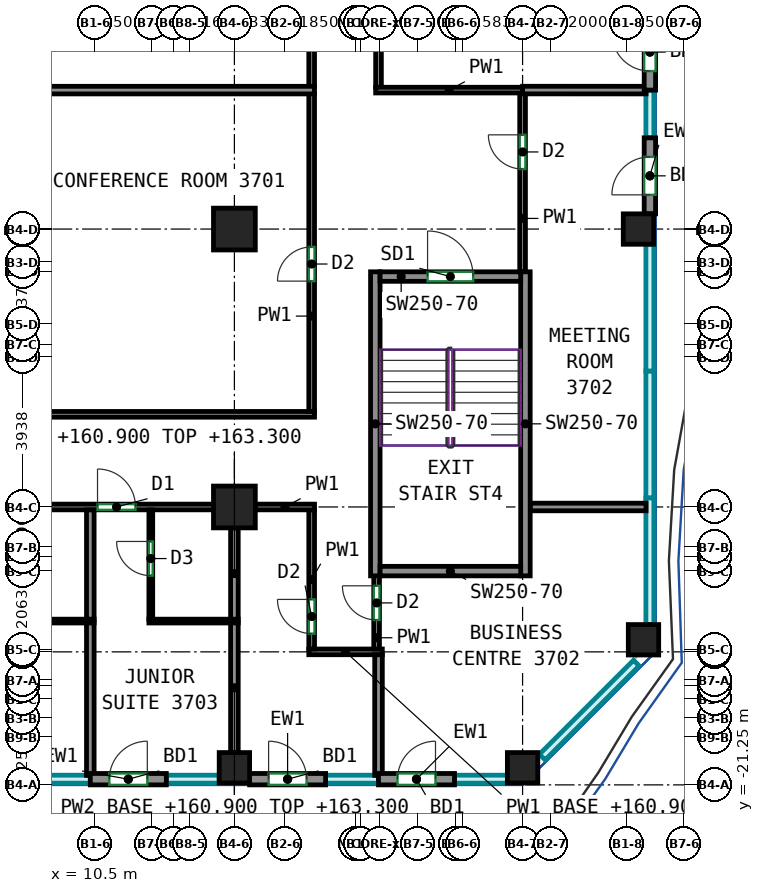
"""IFC4 building model, lengths in metres.
Left out: names, types, materials, properties, quantities, classifications, styles, units other than length and angle.
Written with IfcOpenShell. Run it as: python <this file> out.ifc"""

import sys

from ifc_helpers import new_model, si_unit, direction, frame, frame_2d, origin, origin_2d, place, context, subcontext, project, spatial, rectangle, extrude, source, transform, mapped, element, fill, save


model = new_model("IFC4")
c1 = context("Model", 3, precision=1e-05, world=origin(), true_north=direction((0.0, 1.0)))
c2 = subcontext(c1, "Body", "Model", "MODEL_VIEW")
j1 = project(units=[si_unit("LENGTHUNIT", "METRE"), si_unit("PLANEANGLEUNIT", "RADIAN")], contexts=[c1])
p1 = place(None, origin())
s1 = spatial("IfcSite", under=j1, at=p1, CompositionType="ELEMENT")
p2 = place(p1, origin())
s2 = spatial("IfcBuilding", under=s1, at=p2, CompositionType="ELEMENT")
p3 = place(p2, frame((0.0, 0.0, 160.9)))
s3 = spatial("IfcBuildingStorey", under=s2, at=p3, CompositionType="ELEMENT", Elevation=160.9)
m1 = source(origin(), c2, "Body", "SweptSolid", [
    extrude(rectangle(XDim=0.8, YDim=0.8, at=origin_2d()), origin(), (0.0, 0.0, 1.0), 3.0),
])
p4 = place(p3, frame((14.167, -20.8, 0.0), z_axis=(0.0, 0.0, 1.0), x_axis=(1.0, 0.0, 0.0)))
e1 = element("IfcColumn", 1, at=p4, inside=s3, PredefinedType="COLUMN", context=c2, shape_type="MappedRepresentation", body=[
    mapped(m1, transform((0.0, 0.0, 0.0))),
])
m2 = source(origin(), c2, "Body", "SweptSolid", [
    extrude(rectangle(XDim=1.1, YDim=1.1, at=origin_2d()), origin(), (0.0, 0.0, 1.0), 3.0),
])
for number, where, z_axis, x_axis in (
    (2, (14.167, -13.938, 0.0), (0.0, 0.0, 1.0), (1.0, 0.0, 0.0)),
    (3, (14.167, -6.625, 0.0), (0.0, 0.0, 1.0), (1.0, 0.0, 0.0)),
):
    element("IfcColumn", number, at=place(p3, frame(where, z_axis=z_axis, x_axis=x_axis)), inside=s3, PredefinedType="COLUMN", context=c2, shape_type="MappedRepresentation", body=[
        mapped(m2, transform((0.0, 0.0, 0.0))),
    ])
for number, where, z_axis, x_axis in (
    (4, (21.75, -20.8, 0.0), (0.0, 0.0, 1.0), (1.0, 0.0, 0.0)),
    (5, (24.8, -6.625, 0.0), (0.0, 0.0, 1.0), (1.0, 0.0, 0.0)),
    (6, (24.932, -17.432, 0.0), (0.0, 0.0, 1.0), (1.0, 0.0, 0.0)),
):
    element("IfcColumn", number, at=place(p3, frame(where, z_axis=z_axis, x_axis=x_axis)), inside=s3, PredefinedType="COLUMN", context=c2, shape_type="MappedRepresentation", body=[
        mapped(m1, transform((0.0, 0.0, 0.0))),
    ])
m3 = source(origin(), c2, "Body", "SweptSolid", [
    extrude(rectangle(XDim=8.0, YDim=0.25, at=frame_2d((4.0, 0.0))), origin(), (0.0, 0.0, 1.0), 3.0),
])
for number, where, z_axis, x_axis in (
    (7, (17.875, -15.75, 0.0), (0.0, 0.0, 1.0), (0.0, 1.0, 0.0)),
    (8, (21.825, -15.75, 0.0), (0.0, 0.0, 1.0), (0.0, 1.0, 0.0)),
):
    element("IfcWall", number, at=place(p3, frame(where, z_axis=z_axis, x_axis=x_axis)), inside=s3, PredefinedType="SHEAR", context=c2, shape_type="MappedRepresentation", body=[
        mapped(m3, transform((0.0, 0.0, 0.0))),
    ])
m4 = source(origin(), c2, "Body", "SweptSolid", [
    extrude(rectangle(XDim=3.7, YDim=0.25, at=frame_2d((1.85, 0.0))), origin(), (0.0, 0.0, 1.0), 3.0),
])
p5 = place(p3, frame((18.0, -15.625, 0.0), z_axis=(0.0, 0.0, 1.0), x_axis=(1.0, 0.0, 0.0)))
e9 = element("IfcWall", 9, at=p5, inside=s3, PredefinedType="SHEAR", context=c2, shape_type="MappedRepresentation", body=[
    mapped(m4, transform((0.0, 0.0, 0.0))),
])
p6 = place(p3, frame((18.0, -7.875, 0.0), z_axis=(0.0, 0.0, 1.0), x_axis=(1.0, 0.0, 0.0)))
e10 = element("IfcWall", 10, at=p6, inside=s3, PredefinedType="SHEAR", context=c2, shape_type="MappedRepresentation", body=[
    mapped(m4, transform((0.0, 0.0, 0.0))),
])
p7 = place(p6, frame((1.25, 0.0, 0.0)))
e11 = element("IfcOpeningElement", 11, at=p7, cuts=e10, PredefinedType="OPENING", context=c2, shape_type="SweptSolid", body=[
    extrude(rectangle(XDim=1.2, YDim=2.1, at=frame_2d((0.6, 1.05))), frame((0.0, 0.135, 0.0), z_axis=(0.0, -1.0, 0.0), x_axis=(1.0, 0.0, 0.0)), (0.0, 0.0, 1.0), 0.27),
])
m5 = source(origin(), c2, "Body", "SweptSolid", [
    extrude(rectangle(XDim=2.0, YDim=0.3, at=frame_2d((1.0, 0.0))), origin(), (0.0, 0.0, 1.0), 3.0),
])
p8 = place(p3, frame((10.375, -21.1, 0.0), z_axis=(0.0, 0.0, 1.0), x_axis=(1.0, 0.0, 0.0)))
e12 = element("IfcWall", 12, at=p8, inside=s3, PredefinedType="SOLIDWALL", context=c2, shape_type="MappedRepresentation", body=[
    mapped(m5, transform((0.0, 0.0, 0.0))),
])
p9 = place(p8, frame((0.5, 0.0, 0.0)))
e13 = element("IfcOpeningElement", 13, at=p9, cuts=e12, PredefinedType="OPENING", context=c2, shape_type="SweptSolid", body=[
    extrude(rectangle(XDim=1.0, YDim=2.1, at=frame_2d((0.5, 1.05))), frame((0.0, 0.16, 0.0), z_axis=(0.0, -1.0, 0.0), x_axis=(1.0, 0.0, 0.0)), (0.0, 0.0, 1.0), 0.32),
])
p10 = place(p3, frame((14.567, -21.1, 0.0), z_axis=(0.0, 0.0, 1.0), x_axis=(1.0, 0.0, 0.0)))
e14 = element("IfcWall", 14, at=p10, inside=s3, PredefinedType="SOLIDWALL", context=c2, shape_type="MappedRepresentation", body=[
    mapped(m5, transform((0.0, 0.0, 0.0))),
])
p11 = place(p10, frame((0.5, 0.0, 0.0)))
e15 = element("IfcOpeningElement", 15, at=p11, cuts=e14, PredefinedType="OPENING", context=c2, shape_type="SweptSolid", body=[
    extrude(rectangle(XDim=1.0, YDim=2.1, at=frame_2d((0.5, 1.05))), frame((0.0, 0.16, 0.0), z_axis=(0.0, -1.0, 0.0), x_axis=(1.0, 0.0, 0.0)), (0.0, 0.0, 1.0), 0.32),
])
p12 = place(p3, frame((17.958, -21.1, 0.0), z_axis=(0.0, 0.0, 1.0), x_axis=(1.0, 0.0, 0.0)))
e16 = element("IfcWall", 16, at=p12, inside=s3, PredefinedType="SOLIDWALL", context=c2, shape_type="MappedRepresentation", body=[
    mapped(m5, transform((0.0, 0.0, 0.0))),
])
p13 = place(p12, frame((0.5, 0.0, 0.0)))
e17 = element("IfcOpeningElement", 17, at=p13, cuts=e16, PredefinedType="OPENING", context=c2, shape_type="SweptSolid", body=[
    extrude(rectangle(XDim=1.0, YDim=2.1, at=frame_2d((0.5, 1.05))), frame((0.0, 0.16, 0.0), z_axis=(0.0, -1.0, 0.0), x_axis=(1.0, 0.0, 0.0)), (0.0, 0.0, 1.0), 0.32),
])
p14 = place(p3, frame((25.1, -6.225, 0.0), z_axis=(0.0, 0.0, 1.0), x_axis=(0.0, 1.0, 0.0)))
e18 = element("IfcWall", 18, at=p14, inside=s3, PredefinedType="SOLIDWALL", context=c2, shape_type="MappedRepresentation", body=[
    mapped(m5, transform((0.0, 0.0, 0.0))),
])
p15 = place(p14, frame((0.5, 0.0, 0.0)))
e19 = element("IfcOpeningElement", 19, at=p15, cuts=e18, PredefinedType="OPENING", context=c2, shape_type="SweptSolid", body=[
    extrude(rectangle(XDim=1.0, YDim=2.1, at=frame_2d((0.5, 1.05))), frame((0.0, 0.16, 0.0), z_axis=(0.0, -1.0, 0.0), x_axis=(1.0, 0.0, 0.0)), (0.0, 0.0, 1.0), 0.32),
])
p16 = place(p3, frame((25.1, -2.969, 0.0), z_axis=(0.0, 0.0, 1.0), x_axis=(0.0, 1.0, 0.0)))
e20 = element("IfcWall", 20, at=p16, inside=s3, PredefinedType="SOLIDWALL", context=c2, shape_type="MappedRepresentation", body=[
    mapped(m5, transform((0.0, 0.0, 0.0))),
])
p17 = place(p16, frame((0.5, 0.0, 0.0)))
e21 = element("IfcOpeningElement", 21, at=p17, cuts=e20, PredefinedType="OPENING", context=c2, shape_type="SweptSolid", body=[
    extrude(rectangle(XDim=1.0, YDim=2.1, at=frame_2d((0.5, 1.05))), frame((0.0, 0.16, 0.0), z_axis=(0.0, -1.0, 0.0), x_axis=(1.0, 0.0, 0.0)), (0.0, 0.0, 1.0), 0.32),
])
p18 = place(p3, frame((7.133, -13.938, 0.0), z_axis=(0.0, 0.0, 1.0), x_axis=(1.0, 0.0, 0.0)))
e22 = element("IfcWall", 22, at=p18, inside=s3, PredefinedType="PARTITIONING", context=c2, shape_type="SweptSolid", body=[
    extrude(rectangle(XDim=6.484, YDim=0.15, at=frame_2d((3.242, 0.0))), origin(), (0.0, 0.0, 1.0), 2.4),
])
p19 = place(p18, frame((3.432, 0.0, 0.0)))
e23 = element("IfcOpeningElement", 23, at=p19, cuts=e22, PredefinedType="OPENING", context=c2, shape_type="SweptSolid", body=[
    extrude(rectangle(XDim=1.0, YDim=2.1, at=frame_2d((0.5, 1.05))), frame((0.0, 0.085, 0.0), z_axis=(0.0, -1.0, 0.0), x_axis=(1.0, 0.0, 0.0)), (0.0, 0.0, 1.0), 0.17),
])
p20 = place(p3, frame((16.125, -17.75, 0.0), z_axis=(0.0, 0.0, 1.0), x_axis=(1.0, 0.0, 0.0)))
e24 = element("IfcWall", 24, at=p20, inside=s3, PredefinedType="PARTITIONING", context=c2, shape_type="SweptSolid", body=[
    extrude(rectangle(XDim=1.934, YDim=0.15, at=frame_2d((0.967, 0.0))), origin(), (0.0, 0.0, 1.0), 2.4),
])
p21 = place(p3, frame((16.2, -17.675, 0.0), z_axis=(0.0, 0.0, 1.0), x_axis=(0.0, 1.0, 0.0)))
e25 = element("IfcWall", 25, at=p21, inside=s3, PredefinedType="PARTITIONING", context=c2, shape_type="SweptSolid", body=[
    extrude(rectangle(XDim=3.662, YDim=0.15, at=frame_2d((1.831, 0.0))), origin(), (0.0, 0.0, 1.0), 3.0),
])
p22 = place(p21, frame((0.405, 0.0, 0.0)))
e26 = element("IfcOpeningElement", 26, at=p22, cuts=e25, PredefinedType="OPENING", context=c2, shape_type="SweptSolid", body=[
    extrude(rectangle(XDim=0.9, YDim=2.1, at=frame_2d((0.45, 1.05))), frame((0.0, 0.085, 0.0), z_axis=(0.0, -1.0, 0.0), x_axis=(1.0, 0.0, 0.0)), (0.0, 0.0, 1.0), 0.17),
])
p23 = place(p3, frame((14.717, -13.938, 0.0), z_axis=(0.0, 0.0, 1.0), x_axis=(1.0, 0.0, 0.0)))
e27 = element("IfcWall", 27, at=p23, inside=s3, PredefinedType="PARTITIONING", context=c2, shape_type="SweptSolid", body=[
    extrude(rectangle(XDim=1.558, YDim=0.15, at=frame_2d((0.779, 0.0))), origin(), (0.0, 0.0, 1.0), 3.0),
])
p24 = place(p3, frame((17.909, -17.675, 0.0), z_axis=(0.0, 0.0, 1.0), x_axis=(0.0, 1.0, 0.0)))
e28 = element("IfcWall", 28, at=p24, inside=s3, PredefinedType="PARTITIONING", context=c2, shape_type="SweptSolid", body=[
    extrude(rectangle(XDim=1.975, YDim=0.15, at=frame_2d((0.988, 0.0))), origin(), (0.0, 0.0, 1.0), 3.0),
])
p25 = place(p24, frame((0.763, 0.0, 0.0)))
e29 = element("IfcOpeningElement", 29, at=p25, cuts=e28, PredefinedType="OPENING", context=c2, shape_type="SweptSolid", body=[
    extrude(rectangle(XDim=0.9, YDim=2.1, at=frame_2d((0.45, 1.05))), frame((0.0, 0.085, 0.0), z_axis=(0.0, -1.0, 0.0), x_axis=(1.0, 0.0, 0.0)), (0.0, 0.0, 1.0), 0.17),
])
p26 = place(p3, frame((17.959, -2.894, 0.0), z_axis=(0.0, 0.0, 1.0), x_axis=(0.0, 1.0, 0.0)))
e30 = element("IfcWall", 30, at=p26, inside=s3, PredefinedType="PARTITIONING", context=c2, shape_type="SweptSolid", body=[
    extrude(rectangle(XDim=6.019, YDim=0.15, at=frame_2d((3.01, 0.0))), origin(), (0.0, 0.0, 1.0), 3.0),
])
p27 = place(p26, frame((4.216, 0.0, 0.0)))
e31 = element("IfcOpeningElement", 31, at=p27, cuts=e30, PredefinedType="OPENING", context=c2, shape_type="SweptSolid", body=[
    extrude(rectangle(XDim=0.9, YDim=2.1, at=frame_2d((0.45, 1.05))), frame((0.0, 0.085, 0.0), z_axis=(0.0, -1.0, 0.0), x_axis=(1.0, 0.0, 0.0)), (0.0, 0.0, 1.0), 0.17),
])
p28 = place(p3, frame((21.751, -2.969, 0.0), z_axis=(0.0, 0.0, 1.0), x_axis=(-1.0, 0.0, 0.0)))
e32 = element("IfcWall", 32, at=p28, inside=s3, PredefinedType="PARTITIONING", context=c2, shape_type="SweptSolid", body=[
    extrude(rectangle(XDim=3.867, YDim=0.15, at=frame_2d((1.934, 0.0))), origin(), (0.0, 0.0, 1.0), 3.0),
])
p29 = place(p3, frame((21.75, -7.75, 0.0), z_axis=(0.0, 0.0, 1.0), x_axis=(0.0, 1.0, 0.0)))
e33 = element("IfcWall", 33, at=p29, inside=s3, PredefinedType="PARTITIONING", context=c2, shape_type="SweptSolid", body=[
    extrude(rectangle(XDim=4.682, YDim=0.15, at=frame_2d((2.341, 0.0))), origin(), (0.0, 0.0, 1.0), 3.0),
])
p30 = place(p29, frame((2.704, 0.0, 0.0)))
e34 = element("IfcOpeningElement", 34, at=p30, cuts=e33, PredefinedType="OPENING", context=c2, shape_type="SweptSolid", body=[
    extrude(rectangle(XDim=0.9, YDim=2.1, at=frame_2d((0.45, 1.05))), frame((0.0, 0.085, 0.0), z_axis=(0.0, -1.0, 0.0), x_axis=(1.0, 0.0, 0.0)), (0.0, 0.0, 1.0), 0.17),
])
p31 = place(p3, frame((-12.075, -11.5, 0.0), z_axis=(0.0, 0.0, 1.0), x_axis=(1.0, 0.0, 0.0)))
e35 = element("IfcWall", 35, at=p31, inside=s3, PredefinedType="PARTITIONING", context=c2, shape_type="SweptSolid", body=[
    extrude(rectangle(XDim=28.35, YDim=0.15, at=frame_2d((14.175, 0.0))), origin(), (0.0, 0.0, 1.0), 3.0),
])
p32 = place(p31, frame((11.373, 0.0, 0.0)))
e36 = element("IfcOpeningElement", 36, at=p32, cuts=e35, PredefinedType="OPENING", context=c2, shape_type="SweptSolid", body=[
    extrude(rectangle(XDim=0.9, YDim=2.1, at=frame_2d((0.45, 1.05))), frame((0.0, 0.085, 0.0), z_axis=(0.0, -1.0, 0.0), x_axis=(1.0, 0.0, 0.0)), (0.0, 0.0, 1.0), 0.17),
])
p33 = place(p3, frame((16.2, -11.425, 0.0), z_axis=(0.0, 0.0, 1.0), x_axis=(0.0, 1.0, 0.0)))
e37 = element("IfcWall", 37, at=p33, inside=s3, PredefinedType="PARTITIONING", context=c2, shape_type="SweptSolid", body=[
    extrude(rectangle(XDim=8.366, YDim=0.15, at=frame_2d((4.183, 0.0))), origin(), (0.0, 0.0, 1.0), 3.0),
])
p34 = place(p33, frame((3.43, 0.0, 0.0)))
e38 = element("IfcOpeningElement", 38, at=p34, cuts=e37, PredefinedType="OPENING", context=c2, shape_type="SweptSolid", body=[
    extrude(rectangle(XDim=0.9, YDim=2.1, at=frame_2d((0.45, 1.05))), frame((0.0, 0.085, 0.0), z_axis=(0.0, -1.0, 0.0), x_axis=(1.0, 0.0, 0.0)), (0.0, 0.0, 1.0), 0.17),
])
p35 = place(p3, frame((16.2, -2.879, 0.0), z_axis=(0.0, 0.0, 1.0), x_axis=(0.0, 1.0, 0.0)))
e39 = element("IfcWall", 39, at=p35, inside=s3, PredefinedType="PARTITIONING", context=c2, shape_type="SweptSolid", body=[
    extrude(rectangle(XDim=3.477, YDim=0.15, at=frame_2d((1.738, 0.0))), origin(), (0.0, 0.0, 1.0), 3.0),
])
p36 = place(p35, frame((2.273, 0.0, 0.0)))
e40 = element("IfcOpeningElement", 40, at=p36, cuts=e39, PredefinedType="OPENING", context=c2, shape_type="SweptSolid", body=[
    extrude(rectangle(XDim=0.9, YDim=2.1, at=frame_2d((0.45, 1.05))), frame((0.0, 0.085, 0.0), z_axis=(0.0, -1.0, 0.0), x_axis=(1.0, 0.0, 0.0)), (0.0, 0.0, 1.0), 0.17),
])
p37 = place(p3, frame((8.125, -16.94, 0.0), z_axis=(0.0, 0.0, 1.0), x_axis=(1.0, 0.0, 0.0)))
e41 = element("IfcWall", 41, at=p37, inside=s3, PredefinedType="PARTITIONING", context=c2, shape_type="SweptSolid", body=[
    extrude(rectangle(XDim=2.35, YDim=0.1, at=frame_2d((1.175, 0.0))), origin(), (0.0, 0.0, 1.0), 3.0),
])
p38 = place(p3, frame((10.375, -21.0, 0.0), z_axis=(0.0, 0.0, 1.0), x_axis=(0.0, 1.0, 0.0)))
e42 = element("IfcWall", 42, at=p38, inside=s3, PredefinedType="PARTITIONING", context=c2, shape_type="SweptSolid", body=[
    extrude(rectangle(XDim=4.01, YDim=0.2, at=frame_2d((2.005, 0.0))), origin(), (0.0, 0.0, 1.0), 3.0),
])
p39 = place(p3, frame((10.375, -16.89, 0.0), z_axis=(0.0, 0.0, 1.0), x_axis=(0.0, 1.0, 0.0)))
e43 = element("IfcWall", 43, at=p39, inside=s3, PredefinedType="PARTITIONING", context=c2, shape_type="SweptSolid", body=[
    extrude(rectangle(XDim=2.875, YDim=0.2, at=frame_2d((1.438, 0.0))), origin(), (0.0, 0.0, 1.0), 3.0),
])
p40 = place(p3, frame((11.967, -16.89, 0.0), z_axis=(0.0, 0.0, 1.0), x_axis=(0.0, 1.0, 0.0)))
e44 = element("IfcWall", 44, at=p40, inside=s3, PredefinedType="PARTITIONING", context=c2, shape_type="SweptSolid", body=[
    extrude(rectangle(XDim=2.875, YDim=0.1, at=frame_2d((1.438, 0.0))), origin(), (0.0, 0.0, 1.0), 3.0),
])
p41 = place(p40, frame((1.145, 0.0, 0.0)))
e45 = element("IfcOpeningElement", 45, at=p41, cuts=e44, PredefinedType="OPENING", context=c2, shape_type="SweptSolid", body=[
    extrude(rectangle(XDim=0.9, YDim=2.1, at=frame_2d((0.45, 1.05))), frame((0.0, 0.06, 0.0), z_axis=(0.0, -1.0, 0.0), x_axis=(1.0, 0.0, 0.0)), (0.0, 0.0, 1.0), 0.12),
])
p42 = place(p3, frame((11.917, -16.94, 0.0), z_axis=(0.0, 0.0, 1.0), x_axis=(1.0, 0.0, 0.0)))
e46 = element("IfcWall", 46, at=p42, inside=s3, PredefinedType="PARTITIONING", context=c2, shape_type="SweptSolid", body=[
    extrude(rectangle(XDim=2.35, YDim=0.1, at=frame_2d((1.175, 0.0))), origin(), (0.0, 0.0, 1.0), 3.0),
])
p43 = place(p3, frame((14.167, -20.4, 0.0), z_axis=(0.0, 0.0, 1.0), x_axis=(0.0, 1.0, 0.0)))
e47 = element("IfcWall", 47, at=p43, inside=s3, PredefinedType="PARTITIONING", context=c2, shape_type="SweptSolid", body=[
    extrude(rectangle(XDim=3.41, YDim=0.2, at=frame_2d((1.705, 0.0))), origin(), (0.0, 0.0, 1.0), 2.4),
])
p44 = place(p3, frame((14.167, -16.89, 0.0), z_axis=(0.0, 0.0, 1.0), x_axis=(0.0, 1.0, 0.0)))
e48 = element("IfcWall", 48, at=p44, inside=s3, PredefinedType="PARTITIONING", context=c2, shape_type="SweptSolid", body=[
    extrude(rectangle(XDim=2.402, YDim=0.2, at=frame_2d((1.201, 0.0))), origin(), (0.0, 0.0, 1.0), 2.4),
])
p45 = place(p3, frame((17.959, -21.0, 0.0), z_axis=(0.0, 0.0, 1.0), x_axis=(0.0, 1.0, 0.0)))
e49 = element("IfcWall", 49, at=p45, inside=s3, PredefinedType="PARTITIONING", context=c2, shape_type="SweptSolid", body=[
    extrude(rectangle(XDim=3.173, YDim=0.2, at=frame_2d((1.586, 0.0))), origin(), (0.0, 0.0, 1.0), 3.0),
])
p46 = place(p3, frame((25.0, -13.938, 0.0), z_axis=(0.0, 0.0, 1.0), x_axis=(-1.0, 0.0, 0.0)))
e50 = element("IfcWall", 50, at=p46, inside=s3, PredefinedType="PARTITIONING", context=c2, shape_type="SweptSolid", body=[
    extrude(rectangle(XDim=3.05, YDim=0.2, at=frame_2d((1.525, 0.0))), origin(), (0.0, 0.0, 1.0), 3.0),
])
p47 = place(p3, frame((21.751, -2.968, 0.0), z_axis=(0.0, 0.0, 1.0), x_axis=(0.999999954829, -0.000300571071, 0.0)))
e51 = element("IfcWall", 51, at=p47, inside=s3, PredefinedType="PARTITIONING", context=c2, shape_type="SweptSolid", body=[
    extrude(rectangle(XDim=3.249, YDim=0.2, at=frame_2d((1.625, 0.0))), origin(), (0.0, 0.0, 1.0), 3.0),
])
p48 = place(p3, frame((8.4, -2.969, 0.0), z_axis=(0.0, 0.0, 1.0), x_axis=(1.0, 0.0, 0.0)))
e52 = element("IfcWall", 52, at=p48, inside=s3, PredefinedType="PARTITIONING", context=c2, shape_type="SweptSolid", body=[
    extrude(rectangle(XDim=7.873, YDim=0.2, at=frame_2d((3.937, 0.0))), origin(), (0.0, 0.0, 1.0), 3.0),
])
p49 = place(p9, origin())
e53 = element("IfcDoor", 53, at=p49, inside=s3, OperationType="SINGLE_SWING_RIGHT", PredefinedType="DOOR", context=c2, shape_type="SweptSolid", body=[
    extrude(rectangle(XDim=1.0, YDim=2.1, at=frame_2d((0.5, 1.05))), frame((0.0, 0.025, 0.0), z_axis=(0.0, -1.0, 0.0), x_axis=(1.0, 0.0, 0.0)), (0.0, 0.0, 1.0), 0.05),
])
fill(e13, e53)
p50 = place(p11, origin())
e54 = element("IfcDoor", 54, at=p50, inside=s3, OperationType="SINGLE_SWING_LEFT", PredefinedType="DOOR", context=c2, shape_type="SweptSolid", body=[
    extrude(rectangle(XDim=1.0, YDim=2.1, at=frame_2d((0.5, 1.05))), frame((0.0, 0.025, 0.0), z_axis=(0.0, -1.0, 0.0), x_axis=(1.0, 0.0, 0.0)), (0.0, 0.0, 1.0), 0.05),
])
fill(e15, e54)
p51 = place(p13, origin())
e55 = element("IfcDoor", 55, at=p51, inside=s3, OperationType="SINGLE_SWING_RIGHT", PredefinedType="DOOR", context=c2, shape_type="SweptSolid", body=[
    extrude(rectangle(XDim=1.0, YDim=2.1, at=frame_2d((0.5, 1.05))), frame((0.0, 0.025, 0.0), z_axis=(0.0, -1.0, 0.0), x_axis=(1.0, 0.0, 0.0)), (0.0, 0.0, 1.0), 0.05),
])
fill(e17, e55)
p52 = place(p15, origin())
e56 = element("IfcDoor", 56, at=p52, inside=s3, OperationType="SINGLE_SWING_LEFT", PredefinedType="DOOR", context=c2, shape_type="SweptSolid", body=[
    extrude(rectangle(XDim=1.0, YDim=2.1, at=frame_2d((0.5, 1.05))), frame((0.0, 0.025, 0.0), z_axis=(0.0, -1.0, 0.0), x_axis=(1.0, 0.0, 0.0)), (0.0, 0.0, 1.0), 0.05),
])
fill(e19, e56)
p53 = place(p17, origin())
e57 = element("IfcDoor", 57, at=p53, inside=s3, OperationType="SINGLE_SWING_RIGHT", PredefinedType="DOOR", context=c2, shape_type="SweptSolid", body=[
    extrude(rectangle(XDim=1.0, YDim=2.1, at=frame_2d((0.5, 1.05))), frame((0.0, 0.025, 0.0), z_axis=(0.0, -1.0, 0.0), x_axis=(1.0, 0.0, 0.0)), (0.0, 0.0, 1.0), 0.05),
])
fill(e21, e57)
p54 = place(p7, origin())
e58 = element("IfcDoor", 58, at=p54, inside=s3, OperationType="DOUBLE_DOOR_SINGLE_SWING", PredefinedType="DOOR", context=c2, shape_type="SweptSolid", body=[
    extrude(rectangle(XDim=1.2, YDim=2.1, at=frame_2d((0.6, 1.05))), frame((0.0, 0.025, 0.0), z_axis=(0.0, -1.0, 0.0), x_axis=(1.0, 0.0, 0.0)), (0.0, 0.0, 1.0), 0.05),
])
fill(e11, e58)
p55 = place(p22, origin())
e59 = element("IfcDoor", 59, at=p55, inside=s3, OperationType="SINGLE_SWING_RIGHT", PredefinedType="DOOR", context=c2, shape_type="SweptSolid", body=[
    extrude(rectangle(XDim=0.9, YDim=2.1, at=frame_2d((0.45, 1.05))), frame((0.0, 0.025, 0.0), z_axis=(0.0, -1.0, 0.0), x_axis=(1.0, 0.0, 0.0)), (0.0, 0.0, 1.0), 0.05),
])
fill(e26, e59)
p56 = place(p25, origin())
e60 = element("IfcDoor", 60, at=p56, inside=s3, OperationType="SINGLE_SWING_RIGHT", PredefinedType="DOOR", context=c2, shape_type="SweptSolid", body=[
    extrude(rectangle(XDim=0.9, YDim=2.1, at=frame_2d((0.45, 1.05))), frame((0.0, 0.025, 0.0), z_axis=(0.0, -1.0, 0.0), x_axis=(1.0, 0.0, 0.0)), (0.0, 0.0, 1.0), 0.05),
])
fill(e29, e60)
p57 = place(p41, origin())
e61 = element("IfcDoor", 61, at=p57, inside=s3, OperationType="SINGLE_SWING_RIGHT", PredefinedType="DOOR", context=c2, shape_type="SweptSolid", body=[
    extrude(rectangle(XDim=0.9, YDim=2.1, at=frame_2d((0.45, 1.05))), frame((0.0, 0.025, 0.0), z_axis=(0.0, -1.0, 0.0), x_axis=(1.0, 0.0, 0.0)), (0.0, 0.0, 1.0), 0.05),
])
fill(e45, e61)
p58 = place(p19, origin())
e62 = element("IfcDoor", 62, at=p58, inside=s3, OperationType="SINGLE_SWING_LEFT", PredefinedType="DOOR", context=c2, shape_type="SweptSolid", body=[
    extrude(rectangle(XDim=1.0, YDim=2.1, at=frame_2d((0.5, 1.05))), frame((0.0, 0.025, 0.0), z_axis=(0.0, -1.0, 0.0), x_axis=(1.0, 0.0, 0.0)), (0.0, 0.0, 1.0), 0.05),
])
fill(e23, e62)
p59 = place(p34, origin())
e63 = element("IfcDoor", 63, at=p59, inside=s3, OperationType="SINGLE_SWING_LEFT", PredefinedType="DOOR", context=c2, shape_type="SweptSolid", body=[
    extrude(rectangle(XDim=0.9, YDim=2.1, at=frame_2d((0.45, 1.05))), frame((0.0, 0.025, 0.0), z_axis=(0.0, -1.0, 0.0), x_axis=(1.0, 0.0, 0.0)), (0.0, 0.0, 1.0), 0.05),
])
fill(e38, e63)
p60 = place(p30, origin())
e64 = element("IfcDoor", 64, at=p60, inside=s3, OperationType="SINGLE_SWING_RIGHT", PredefinedType="DOOR", context=c2, shape_type="SweptSolid", body=[
    extrude(rectangle(XDim=0.9, YDim=2.1, at=frame_2d((0.45, 1.05))), frame((0.0, 0.025, 0.0), z_axis=(0.0, -1.0, 0.0), x_axis=(1.0, 0.0, 0.0)), (0.0, 0.0, 1.0), 0.05),
])
fill(e34, e64)
save(model, sys.argv[1])
